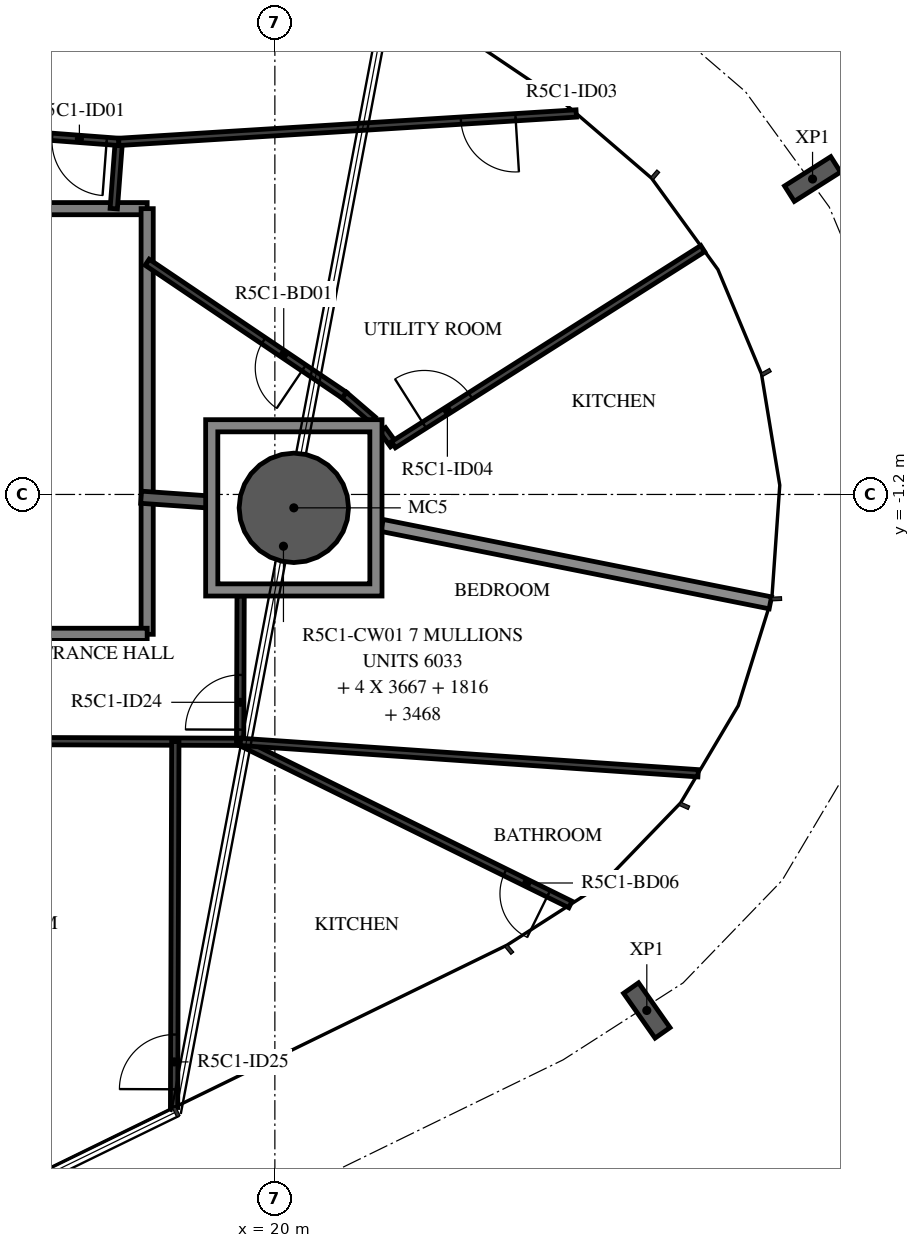
"""IFC4 building model, lengths in metres.
Left out: names, types, materials, properties, quantities, classifications, styles, units other than length and angle.
Written with IfcOpenShell. Run it as: python <this file> out.ifc"""

import sys

from ifc_helpers import new_model, si_unit, direction, frame, frame_2d, origin, origin_2d, place, context, subcontext, project, spatial, polyline, rectangle, hollow_circle, i_section, outline, extrude, element, fill, save


model = new_model("IFC4")
c1 = context("Model", 3, precision=1e-05, world=origin(), true_north=direction((0.0, 1.0)))
c2 = subcontext(c1, "Body", "Model", "MODEL_VIEW")
j1 = project(units=[si_unit("LENGTHUNIT", "METRE"), si_unit("PLANEANGLEUNIT", "RADIAN")], contexts=[c1])
p1 = place(None, origin())
s1 = spatial("IfcSite", under=j1, at=p1, CompositionType="ELEMENT")
p2 = place(p1, origin())
s2 = spatial("IfcBuilding", under=s1, at=p2, CompositionType="ELEMENT")
p3 = place(p2, frame((0.0, 0.0, 212.9)))
s3 = spatial("IfcBuildingStorey", under=s2, at=p3, CompositionType="ELEMENT", Elevation=212.9)
p4 = place(p3, frame((20.312, -1.42, -0.38), z_axis=(0.0, 0.0, 1.0), x_axis=(1.0, 0.0, 0.0)))
e1 = element("IfcColumn", 1, at=p4, inside=s3, PredefinedType="COLUMN", context=c2, shape_type="SweptSolid", body=[
    extrude(hollow_circle(Radius=0.9, WallThickness=0.04, at=origin_2d()), origin(), (0.0, 0.0, 1.0), 3.5),
])
for number, where, z_axis, x_axis in (
    (2, (26.117, -9.686, -0.38), (0.0, 0.0, 1.0), (-0.818, -0.575, 0.0)),
    (3, (28.842, 3.987, -0.38), (0.0, 0.0, 1.0), (0.535, -0.845, 0.0)),
):
    element("IfcColumn", number, at=place(p3, frame(where, z_axis=z_axis, x_axis=x_axis)), inside=s3, PredefinedType="COLUMN", context=c2, shape_type="SweptSolid", body=[
        extrude(i_section(OverallWidth=0.3, OverallDepth=0.9, WebThickness=0.019, FlangeThickness=0.035, FilletRadius=0.03, at=origin_2d()), origin(), (0.0, 0.0, 1.0), 3.5),
    ])
p5 = place(p3, frame((17.9, 3.5, 0.0), z_axis=(0.0, 0.0, 1.0), x_axis=(-1.0, 0.0, 0.0)))
e4 = element("IfcWall", 4, at=p5, inside=s3, PredefinedType="STANDARD", context=c2, shape_type="SweptSolid", body=[
    extrude(rectangle(XDim=4.698, YDim=0.2, at=frame_2d((2.349, 0.0))), origin(), (0.0, 0.0, 1.0), 3.12),
])
p6 = place(p3, frame((17.9, -3.5, 0.0), z_axis=(0.0, 0.0, 1.0), x_axis=(0.0, 1.0, 0.0)))
e5 = element("IfcWall", 5, at=p6, inside=s3, PredefinedType="STANDARD", context=c2, shape_type="SweptSolid", body=[
    extrude(rectangle(XDim=7.0, YDim=0.2, at=frame_2d((3.5, 0.0))), origin(), (0.0, 0.0, 1.0), 3.12),
])
p7 = place(p3, frame((13.188, -3.5, 0.0), z_axis=(0.0, 0.0, 1.0), x_axis=(1.0, 0.0, 0.0)))
e6 = element("IfcWall", 6, at=p7, inside=s3, PredefinedType="STANDARD", context=c2, shape_type="SweptSolid", body=[
    extrude(rectangle(XDim=4.712, YDim=0.2, at=frame_2d((2.356, 0.0))), origin(), (0.0, 0.0, 1.0), 3.12),
])
p8 = place(p3, frame((17.8, -1.246, 0.0), z_axis=(0.0, 0.0, 1.0), x_axis=(0.997562681713, -0.069776042122, 0.0)))
e7 = element("IfcWall", 7, at=p8, inside=s3, PredefinedType="STANDARD", context=c2, shape_type="SweptSolid", body=[
    extrude(rectangle(XDim=1.144, YDim=0.2, at=frame_2d((0.572, 0.0))), origin(), (0.0, 0.0, 1.0), 3.12),
])
p9 = place(p3, frame((21.762, -1.709, 0.0), z_axis=(0.0, 0.0, 1.0), x_axis=(0.980707365343, -0.195481619501, 0.0)))
e8 = element("IfcWall", 8, at=p9, inside=s3, PredefinedType="STANDARD", context=c2, shape_type="SweptSolid", body=[
    extrude(rectangle(XDim=6.512, YDim=0.2, at=frame_2d((3.256, 0.0))), origin(), (0.0, 0.0, 1.0), 2.73),
])
p10 = place(p3, frame((17.351, 3.5, 0.0), z_axis=(0.0, 0.0, 1.0), x_axis=(0.075374124137, 0.997155324616, 0.0)))
e9 = element("IfcWall", 9, at=p10, inside=s3, PredefinedType="PARTITIONING", context=c2, shape_type="SweptSolid", body=[
    extrude(rectangle(XDim=1.101, YDim=0.12, at=frame_2d((0.551, 0.0))), origin(), (0.0, 0.0, 1.0), 3.12),
])
p11 = place(p3, frame((17.434, 4.598, 0.0), z_axis=(0.0, 0.0, 1.0), x_axis=(-0.997152077354, 0.075417071205, 0.0)))
e10 = element("IfcWall", 10, at=p11, inside=s3, PredefinedType="PARTITIONING", context=c2, shape_type="SweptSolid", body=[
    extrude(rectangle(XDim=2.787, YDim=0.12, at=frame_2d((1.394, 0.0))), origin(), (0.0, 0.0, 1.0), 3.12),
])
p12 = place(p11, frame((0.2, 0.0, 0.0)))
e11 = element("IfcOpeningElement", 11, at=p12, cuts=e10, PredefinedType="OPENING", context=c2, shape_type="SweptSolid", body=[
    extrude(rectangle(XDim=0.9, YDim=2.1, at=frame_2d((0.45, 1.05))), frame((0.0, 0.07, 0.0), z_axis=(0.0, -1.0, 0.0), x_axis=(1.0, 0.0, 0.0)), (0.0, 0.0, 1.0), 0.14),
])
p13 = place(p3, frame((21.61, 0.03, 0.0), z_axis=(0.0, 0.0, 1.0), x_axis=(-0.758532196215, 0.651635563259, 0.0)))
e12 = element("IfcWall", 12, at=p13, inside=s3, PredefinedType="PARTITIONING", context=c2, shape_type="SweptSolid", body=[
    extrude(rectangle(XDim=0.619, YDim=0.12, at=frame_2d((0.31, 0.0))), origin(), (0.0, 0.0, 1.0), 3.12),
])
p14 = place(p3, frame((21.141, 0.433, 0.0), z_axis=(0.0, 0.0, 1.0), x_axis=(-0.829049908454, 0.559174614313, 0.0)))
e13 = element("IfcWall", 13, at=p14, inside=s3, PredefinedType="PARTITIONING", context=c2, shape_type="SweptSolid", body=[
    extrude(rectangle(XDim=3.909, YDim=0.12, at=frame_2d((1.955, 0.0))), origin(), (0.0, 0.0, 1.0), 3.12),
])
p15 = place(p14, frame((0.8, 0.0, 0.0)))
e14 = element("IfcOpeningElement", 14, at=p15, cuts=e13, PredefinedType="OPENING", context=c2, shape_type="SweptSolid", body=[
    extrude(rectangle(XDim=0.8, YDim=2.1, at=frame_2d((0.4, 1.05))), frame((0.0, 0.07, 0.0), z_axis=(0.0, -1.0, 0.0), x_axis=(1.0, 0.0, 0.0)), (0.0, 0.0, 1.0), 0.14),
])
p16 = place(p3, frame((24.956, 5.065, 0.0), z_axis=(0.0, 0.0, 1.0), x_axis=(-0.998076202118, -0.061999151332, 0.0)))
e15 = element("IfcWall", 15, at=p16, inside=s3, PredefinedType="PARTITIONING", context=c2, shape_type="SweptSolid", body=[
    extrude(rectangle(XDim=7.537, YDim=0.12, at=frame_2d((3.769, 0.0))), origin(), (0.0, 0.0, 1.0), 3.12),
])
p17 = place(p16, frame((1.0, 0.0, 0.0)))
e16 = element("IfcOpeningElement", 16, at=p17, cuts=e15, PredefinedType="OPENING", context=c2, shape_type="SweptSolid", body=[
    extrude(rectangle(XDim=0.9, YDim=2.1, at=frame_2d((0.45, 1.05))), frame((0.0, 0.07, 0.0), z_axis=(0.0, -1.0, 0.0), x_axis=(1.0, 0.0, 0.0)), (0.0, 0.0, 1.0), 0.14),
])
p18 = place(p3, frame((21.772, -0.136, 0.0), z_axis=(0.0, 0.0, 1.0), x_axis=(0.587310294779, -0.809361858285, 0.0)))
e17 = element("IfcWall", 17, at=p18, inside=s3, PredefinedType="PARTITIONING", context=c2, shape_type="SweptSolid", body=[
    extrude(rectangle(XDim=0.303, YDim=0.12, at=frame_2d((0.152, 0.0))), origin(), (0.0, 0.0, 1.0), 3.12),
])
p19 = place(p3, frame((21.95, -0.382, 0.0), z_axis=(0.0, 0.0, 1.0), x_axis=(0.844596663126, 0.535403097336, 0.0)))
e18 = element("IfcWall", 18, at=p19, inside=s3, PredefinedType="PARTITIONING", context=c2, shape_type="SweptSolid", body=[
    extrude(rectangle(XDim=6.022, YDim=0.12, at=frame_2d((3.011, 0.0))), origin(), (0.0, 0.0, 1.0), 2.73),
])
p20 = place(p19, frame((0.6, 0.0, 0.0)))
e19 = element("IfcOpeningElement", 19, at=p20, cuts=e18, PredefinedType="OPENING", context=c2, shape_type="SweptSolid", body=[
    extrude(rectangle(XDim=0.9, YDim=2.1, at=frame_2d((0.45, 1.05))), frame((0.0, 0.07, 0.0), z_axis=(0.0, -1.0, 0.0), x_axis=(1.0, 0.0, 0.0)), (0.0, 0.0, 1.0), 0.14),
])
p21 = place(p3, frame((14.431, -5.251, 0.0), z_axis=(0.0, 0.0, 1.0), x_axis=(0.999994153659, -0.003419451456, 0.0)))
e20 = element("IfcWall", 20, at=p21, inside=s3, PredefinedType="PARTITIONING", context=c2, shape_type="SweptSolid", body=[
    extrude(rectangle(XDim=4.998, YDim=0.12, at=frame_2d((2.499, 0.0))), origin(), (0.0, 0.0, 1.0), 3.12),
])
p22 = place(p3, frame((19.429, -5.268, 0.0), z_axis=(0.0, 0.0, 1.0), x_axis=(0.003360127656, 0.999994354755, 0.0)))
e21 = element("IfcWall", 21, at=p22, inside=s3, PredefinedType="PARTITIONING", context=c2, shape_type="SweptSolid", body=[
    extrude(rectangle(XDim=2.398, YDim=0.12, at=frame_2d((1.199, 0.0))), origin(), (0.0, 0.0, 1.0), 3.12),
])
p23 = place(p22, frame((0.2, 0.0, 0.0)))
e22 = element("IfcOpeningElement", 22, at=p23, cuts=e21, PredefinedType="OPENING", context=c2, shape_type="SweptSolid", body=[
    extrude(rectangle(XDim=0.9, YDim=2.1, at=frame_2d((0.45, 1.05))), frame((0.0, 0.07, 0.0), z_axis=(0.0, -1.0, 0.0), x_axis=(1.0, 0.0, 0.0)), (0.0, 0.0, 1.0), 0.14),
])
p24 = place(p3, frame((18.343, -11.282, 0.0), z_axis=(0.0, 0.0, 1.0), x_axis=(0.003448675073, 0.999994053302, 0.0)))
e23 = element("IfcWall", 23, at=p24, inside=s3, PredefinedType="PARTITIONING", context=c2, shape_type="SweptSolid", body=[
    extrude(rectangle(XDim=6.017, YDim=0.12, at=frame_2d((3.009, 0.0))), origin(), (0.0, 0.0, 1.0), 3.12),
])
p25 = place(p24, frame((0.3, 0.0, 0.0)))
e24 = element("IfcOpeningElement", 24, at=p25, cuts=e23, PredefinedType="OPENING", context=c2, shape_type="SweptSolid", body=[
    extrude(rectangle(XDim=0.9, YDim=2.1, at=frame_2d((0.45, 1.05))), frame((0.0, 0.07, 0.0), z_axis=(0.0, -1.0, 0.0), x_axis=(1.0, 0.0, 0.0)), (0.0, 0.0, 1.0), 0.14),
])
p26 = place(p3, frame((24.861, -7.943, 0.0), z_axis=(0.0, 0.0, 1.0), x_axis=(-0.897128390861, 0.441769906525, 0.0)))
e25 = element("IfcWall", 25, at=p26, inside=s3, PredefinedType="PARTITIONING", context=c2, shape_type="SweptSolid", body=[
    extrude(rectangle(XDim=6.055, YDim=0.12, at=frame_2d((3.027, 0.0))), origin(), (0.0, 0.0, 1.0), 3.12),
])
p27 = place(p26, frame((0.4, 0.0, 0.0)))
e26 = element("IfcOpeningElement", 26, at=p27, cuts=e25, PredefinedType="OPENING", context=c2, shape_type="SweptSolid", body=[
    extrude(rectangle(XDim=0.8, YDim=2.1, at=frame_2d((0.4, 1.05))), frame((0.0, 0.07, 0.0), z_axis=(0.0, -1.0, 0.0), x_axis=(1.0, 0.0, 0.0)), (0.0, 0.0, 1.0), 0.14),
])
p28 = place(p3, frame((26.961, -5.785, 0.0), z_axis=(0.0, 0.0, 1.0), x_axis=(-0.997652165985, 0.068484711466, 0.0)))
e27 = element("IfcWall", 27, at=p28, inside=s3, PredefinedType="PARTITIONING", context=c2, shape_type="SweptSolid", body=[
    extrude(rectangle(XDim=7.551, YDim=0.12, at=frame_2d((3.775, 0.0))), origin(), (0.0, 0.0, 1.0), 3.12),
])
p29 = place(p3, origin())
e28 = element("IfcWall", 28, at=p29, inside=s3, PredefinedType="STANDARD", context=c2, shape_type="SweptSolid", body=[
    extrude(outline(polyline([(21.762, 0.03), (21.762, -2.87), (18.862, -2.87), (18.862, 0.03), (21.762, 0.03)]), holes=[polyline([(19.062, -2.67), (21.562, -2.67), (21.562, -0.17), (19.062, -0.17), (19.062, -2.67)])]), origin(), (0.0, 0.0, 1.0), 3.12),
])
p30 = place(p12, origin())
e29 = element("IfcDoor", 29, at=p30, inside=s3, OperationType="SINGLE_SWING_LEFT", PredefinedType="DOOR", context=c2, shape_type="SweptSolid", body=[
    extrude(rectangle(XDim=0.9, YDim=2.1, at=frame_2d((0.45, 1.05))), frame((0.0, 0.025, 0.0), z_axis=(0.0, -1.0, 0.0), x_axis=(1.0, 0.0, 0.0)), (0.0, 0.0, 1.0), 0.05),
])
fill(e11, e29)
p31 = place(p17, origin())
e30 = element("IfcDoor", 30, at=p31, inside=s3, OperationType="SINGLE_SWING_LEFT", PredefinedType="DOOR", context=c2, shape_type="SweptSolid", body=[
    extrude(rectangle(XDim=0.9, YDim=2.1, at=frame_2d((0.45, 1.05))), frame((0.0, 0.025, 0.0), z_axis=(0.0, -1.0, 0.0), x_axis=(1.0, 0.0, 0.0)), (0.0, 0.0, 1.0), 0.05),
])
fill(e16, e30)
p32 = place(p15, origin())
e31 = element("IfcDoor", 31, at=p32, inside=s3, OperationType="SINGLE_SWING_RIGHT", PredefinedType="DOOR", context=c2, shape_type="SweptSolid", body=[
    extrude(rectangle(XDim=0.8, YDim=2.1, at=frame_2d((0.4, 1.05))), frame((0.0, 0.025, 0.0), z_axis=(0.0, -1.0, 0.0), x_axis=(1.0, 0.0, 0.0)), (0.0, 0.0, 1.0), 0.05),
])
fill(e14, e31)
p33 = place(p20, origin())
e32 = element("IfcDoor", 32, at=p33, inside=s3, OperationType="SINGLE_SWING_LEFT", PredefinedType="DOOR", context=c2, shape_type="SweptSolid", body=[
    extrude(rectangle(XDim=0.9, YDim=2.1, at=frame_2d((0.45, 1.05))), frame((0.0, 0.025, 0.0), z_axis=(0.0, -1.0, 0.0), x_axis=(1.0, 0.0, 0.0)), (0.0, 0.0, 1.0), 0.05),
])
fill(e19, e32)
p34 = place(p23, origin())
e33 = element("IfcDoor", 33, at=p34, inside=s3, OperationType="SINGLE_SWING_RIGHT", PredefinedType="DOOR", context=c2, shape_type="SweptSolid", body=[
    extrude(rectangle(XDim=0.9, YDim=2.1, at=frame_2d((0.45, 1.05))), frame((0.0, 0.025, 0.0), z_axis=(0.0, -1.0, 0.0), x_axis=(1.0, 0.0, 0.0)), (0.0, 0.0, 1.0), 0.05),
])
fill(e22, e33)
p35 = place(p25, origin())
e34 = element("IfcDoor", 34, at=p35, inside=s3, OperationType="SINGLE_SWING_RIGHT", PredefinedType="DOOR", context=c2, shape_type="SweptSolid", body=[
    extrude(rectangle(XDim=0.9, YDim=2.1, at=frame_2d((0.45, 1.05))), frame((0.0, 0.025, 0.0), z_axis=(0.0, -1.0, 0.0), x_axis=(1.0, 0.0, 0.0)), (0.0, 0.0, 1.0), 0.05),
])
fill(e24, e34)
p36 = place(p27, origin())
e35 = element("IfcDoor", 35, at=p36, inside=s3, OperationType="SINGLE_SWING_RIGHT", PredefinedType="DOOR", context=c2, shape_type="SweptSolid", body=[
    extrude(rectangle(XDim=0.8, YDim=2.1, at=frame_2d((0.4, 1.05))), frame((0.0, 0.025, 0.0), z_axis=(0.0, -1.0, 0.0), x_axis=(1.0, 0.0, 0.0)), (0.0, 0.0, 1.0), 0.05),
])
fill(e26, e35)
save(model, sys.argv[1])
